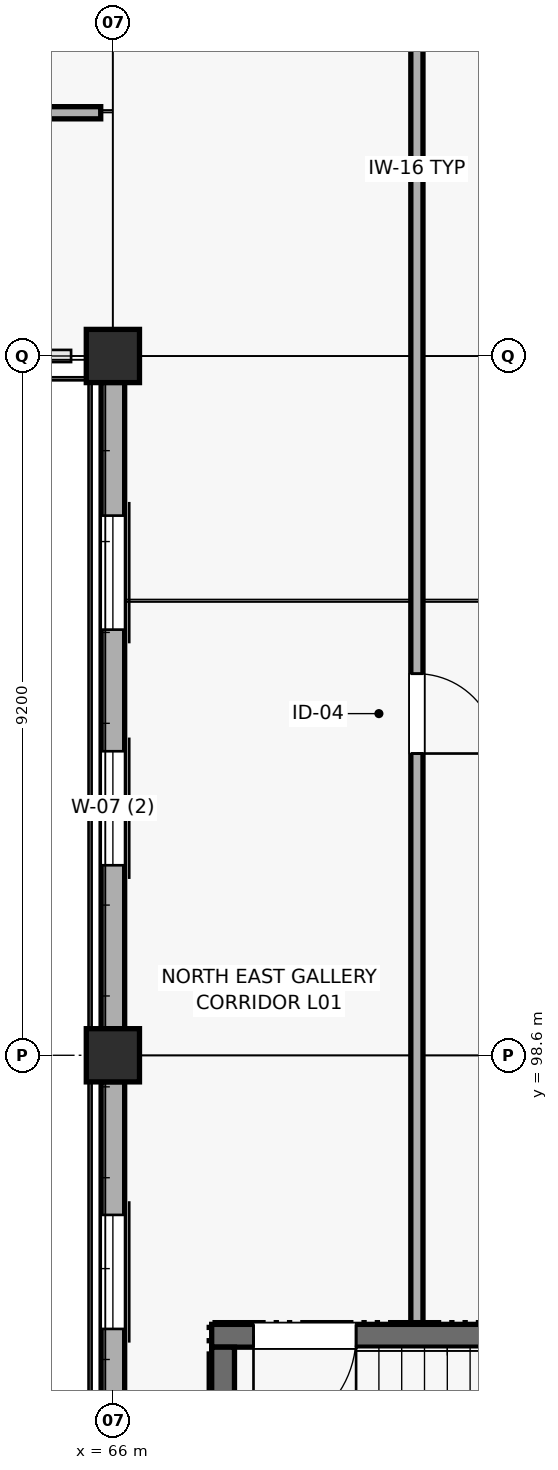
"""IFC4 building model, lengths in metres.
Left out: names, types, materials, properties, quantities, classifications, styles, units other than length and angle.
Written with IfcOpenShell. Run it as: python <this file> out.ifc"""

import sys

from ifc_helpers import new_model, si_unit, direction, frame, frame_2d, origin, origin_2d, place, context, subcontext, project, spatial, rectangle, extrude, element, fill, save


model = new_model("IFC4")
c1 = context("Model", 3, precision=1e-05, world=origin(), true_north=direction((0.0, 1.0)))
c2 = subcontext(c1, "Body", "Model", "MODEL_VIEW")
j1 = project(units=[si_unit("LENGTHUNIT", "METRE"), si_unit("PLANEANGLEUNIT", "RADIAN")], contexts=[c1])
p1 = place(None, origin())
s1 = spatial("IfcSite", under=j1, at=p1, CompositionType="ELEMENT")
p2 = place(p1, origin())
s2 = spatial("IfcBuilding", under=s1, at=p2, CompositionType="ELEMENT")
p3 = place(p2, frame((0.0, 0.0, 5.4)))
s3 = spatial("IfcBuildingStorey", under=s2, at=p3, CompositionType="ELEMENT", Elevation=5.4)
for number, where, z_axis, x_axis in (
    (1, (66.0, 98.6, 0.0), (0.0, 0.0, 1.0), (1.0, 0.0, 0.0)),
    (2, (66.0, 107.8, 0.0), (0.0, 0.0, 1.0), (1.0, 0.0, 0.0)),
):
    element("IfcColumn", number, at=place(p3, frame(where, z_axis=z_axis, x_axis=x_axis)), inside=s3, PredefinedType="COLUMN", context=c2, shape_type="SweptSolid", body=[
        extrude(rectangle(XDim=0.7, YDim=0.7, at=origin_2d()), origin(), (0.0, 0.0, 1.0), 4.5),
    ])
p4 = place(p3, frame((66.0, 89.748, 0.0), z_axis=(0.0, 0.0, 1.0), x_axis=(0.0, 1.0, 0.0)))
e3 = element("IfcWall", 3, at=p4, inside=s3, PredefinedType="SOLIDWALL", context=c2, shape_type="SweptSolid", body=[
    extrude(rectangle(XDim=8.504, YDim=0.31, at=frame_2d((4.252, 0.0))), origin(), (0.0, 0.0, 1.0), 3.725),
])
p5 = place(p4, frame((2.152, 0.0, 0.95)))
e4 = element("IfcOpeningElement", 4, at=p5, cuts=e3, PredefinedType="OPENING", context=c2, shape_type="SweptSolid", body=[
    extrude(rectangle(XDim=1.5, YDim=2.25, at=frame_2d((0.75, 1.125))), frame((0.0, 0.165, 0.0), z_axis=(0.0, -1.0, 0.0), x_axis=(1.0, 0.0, 0.0)), (0.0, 0.0, 1.0), 0.33),
])
p6 = place(p4, frame((5.252, 0.0, 0.95)))
e5 = element("IfcOpeningElement", 5, at=p6, cuts=e3, PredefinedType="OPENING", context=c2, shape_type="SweptSolid", body=[
    extrude(rectangle(XDim=1.5, YDim=2.25, at=frame_2d((0.75, 1.125))), frame((0.0, 0.165, 0.0), z_axis=(0.0, -1.0, 0.0), x_axis=(1.0, 0.0, 0.0)), (0.0, 0.0, 1.0), 0.33),
])
p7 = place(p3, frame((66.0, 98.948, 0.0), z_axis=(0.0, 0.0, 1.0), x_axis=(0.0, 1.0, 0.0)))
e6 = element("IfcWall", 6, at=p7, inside=s3, PredefinedType="SOLIDWALL", context=c2, shape_type="SweptSolid", body=[
    extrude(rectangle(XDim=8.504, YDim=0.31, at=frame_2d((4.252, 0.0))), origin(), (0.0, 0.0, 1.0), 3.725),
])
p8 = place(p7, frame((2.152, 0.0, 0.95)))
e7 = element("IfcOpeningElement", 7, at=p8, cuts=e6, PredefinedType="OPENING", context=c2, shape_type="SweptSolid", body=[
    extrude(rectangle(XDim=1.5, YDim=2.25, at=frame_2d((0.75, 1.125))), frame((0.0, 0.165, 0.0), z_axis=(0.0, -1.0, 0.0), x_axis=(1.0, 0.0, 0.0)), (0.0, 0.0, 1.0), 0.33),
])
p9 = place(p7, frame((5.252, 0.0, 0.95)))
e8 = element("IfcOpeningElement", 8, at=p9, cuts=e6, PredefinedType="OPENING", context=c2, shape_type="SweptSolid", body=[
    extrude(rectangle(XDim=1.5, YDim=2.25, at=frame_2d((0.75, 1.125))), frame((0.0, 0.165, 0.0), z_axis=(0.0, -1.0, 0.0), x_axis=(1.0, 0.0, 0.0)), (0.0, 0.0, 1.0), 0.33),
])
p10 = place(p3, frame((75.95, 94.91, 0.0), z_axis=(0.0, 0.0, 1.0), x_axis=(-1.0, 0.0, 0.0)))
e9 = element("IfcWall", 9, at=p10, inside=s3, PredefinedType="SHEAR", context=c2, shape_type="SweptSolid", body=[
    extrude(rectangle(XDim=8.65, YDim=0.3, at=frame_2d((4.325, 0.0))), origin(), (0.0, 0.0, 1.0), 4.28),
])
p11 = place(p10, frame((6.75, 0.0, 0.0)))
e10 = element("IfcOpeningElement", 10, at=p11, cuts=e9, PredefinedType="OPENING", context=c2, shape_type="SweptSolid", body=[
    extrude(rectangle(XDim=1.35, YDim=2.2, at=frame_2d((0.675, 1.1))), frame((0.0, 0.16, 0.0), z_axis=(0.0, -1.0, 0.0), x_axis=(1.0, 0.0, 0.0)), (0.0, 0.0, 1.0), 0.32),
])
p12 = place(p3, frame((67.45, 94.76, 0.0), z_axis=(0.0, 0.0, 1.0), x_axis=(0.0, -1.0, 0.0)))
e11 = element("IfcWall", 11, at=p12, inside=s3, PredefinedType="SHEAR", context=c2, shape_type="SweptSolid", body=[
    extrude(rectangle(XDim=3.36, YDim=0.3, at=frame_2d((1.68, 0.0))), origin(), (0.0, 0.0, 1.0), 4.28),
])
p13 = place(p3, frame((22.16, 111.0, 0.0), z_axis=(0.0, 0.0, 1.0), x_axis=(1.0, 0.0, 0.0)))
e12 = element("IfcWall", 12, at=p13, inside=s3, PredefinedType="PARTITIONING", context=c2, shape_type="SweptSolid", body=[
    extrude(rectangle(XDim=43.68, YDim=0.16, at=frame_2d((21.84, 0.0))), origin(), (0.0, 0.0, 1.0), 3.725),
])
p14 = place(p13, frame((12.0, 0.0, 0.0)))
e13 = element("IfcOpeningElement", 13, at=p14, cuts=e12, PredefinedType="OPENING", context=c2, shape_type="SweptSolid", body=[
    extrude(rectangle(XDim=1.7, YDim=2.35, at=frame_2d((0.85, 1.175))), frame((0.0, 0.09, 0.0), z_axis=(0.0, -1.0, 0.0), x_axis=(1.0, 0.0, 0.0)), (0.0, 0.0, 1.0), 0.18),
])
p15 = place(p13, frame((35.5, 0.0, 0.0)))
e14 = element("IfcOpeningElement", 14, at=p15, cuts=e12, PredefinedType="OPENING", context=c2, shape_type="SweptSolid", body=[
    extrude(rectangle(XDim=1.02, YDim=2.15, at=frame_2d((0.51, 1.075))), frame((0.0, 0.09, 0.0), z_axis=(0.0, -1.0, 0.0), x_axis=(1.0, 0.0, 0.0)), (0.0, 0.0, 1.0), 0.18),
])
p16 = place(p3, frame((70.0, 95.065, 0.0), z_axis=(0.0, 0.0, 1.0), x_axis=(0.0, 1.0, 0.0)))
e15 = element("IfcWall", 15, at=p16, inside=s3, PredefinedType="PARTITIONING", context=c2, shape_type="SweptSolid", body=[
    extrude(rectangle(XDim=21.76, YDim=0.16, at=frame_2d((10.88, 0.0))), origin(), (0.0, 0.0, 1.0), 3.625),
])
p17 = place(p16, frame((7.505, 0.0, 0.0)))
e16 = element("IfcOpeningElement", 16, at=p17, cuts=e15, PredefinedType="OPENING", context=c2, shape_type="SweptSolid", body=[
    extrude(rectangle(XDim=1.05, YDim=2.2, at=frame_2d((0.525, 1.1))), frame((0.0, 0.09, 0.0), z_axis=(0.0, -1.0, 0.0), x_axis=(1.0, 0.0, 0.0)), (0.0, 0.0, 1.0), 0.18),
])
p18 = place(p6, origin())
e17 = element("IfcWindow", 17, at=p18, inside=s3, PartitioningType="SINGLE_PANEL", PredefinedType="WINDOW", context=c2, shape_type="SweptSolid", body=[
    extrude(rectangle(XDim=1.5, YDim=2.25, at=frame_2d((0.75, 1.125))), frame((0.0, 0.03, 0.0), z_axis=(0.0, -1.0, 0.0), x_axis=(1.0, 0.0, 0.0)), (0.0, 0.0, 1.0), 0.06),
])
fill(e5, e17)
p19 = place(p8, origin())
e18 = element("IfcWindow", 18, at=p19, inside=s3, PartitioningType="SINGLE_PANEL", PredefinedType="WINDOW", context=c2, shape_type="SweptSolid", body=[
    extrude(rectangle(XDim=1.5, YDim=2.25, at=frame_2d((0.75, 1.125))), frame((0.0, 0.03, 0.0), z_axis=(0.0, -1.0, 0.0), x_axis=(1.0, 0.0, 0.0)), (0.0, 0.0, 1.0), 0.06),
])
fill(e7, e18)
p20 = place(p9, origin())
e19 = element("IfcWindow", 19, at=p20, inside=s3, PartitioningType="SINGLE_PANEL", PredefinedType="WINDOW", context=c2, shape_type="SweptSolid", body=[
    extrude(rectangle(XDim=1.5, YDim=2.25, at=frame_2d((0.75, 1.125))), frame((0.0, 0.03, 0.0), z_axis=(0.0, -1.0, 0.0), x_axis=(1.0, 0.0, 0.0)), (0.0, 0.0, 1.0), 0.06),
])
fill(e8, e19)
p21 = place(p11, origin())
e20 = element("IfcDoor", 20, at=p21, inside=s3, OperationType="SINGLE_SWING_RIGHT", PredefinedType="DOOR", context=c2, shape_type="SweptSolid", body=[
    extrude(rectangle(XDim=1.35, YDim=2.2, at=frame_2d((0.675, 1.1))), frame((0.0, 0.025, 0.0), z_axis=(0.0, -1.0, 0.0), x_axis=(1.0, 0.0, 0.0)), (0.0, 0.0, 1.0), 0.05),
])
fill(e10, e20)
p22 = place(p17, frame((1.05, 0.0, 0.0), z_axis=(0.0, 0.0, 1.0), x_axis=(-1.0, 0.0, 0.0)))
e21 = element("IfcDoor", 21, at=p22, inside=s3, OperationType="SINGLE_SWING_RIGHT", PredefinedType="DOOR", context=c2, shape_type="SweptSolid", body=[
    extrude(rectangle(XDim=1.05, YDim=2.2, at=frame_2d((0.525, 1.1))), frame((0.0, 0.025, 0.0), z_axis=(0.0, -1.0, 0.0), x_axis=(1.0, 0.0, 0.0)), (0.0, 0.0, 1.0), 0.05),
])
fill(e16, e21)
save(model, sys.argv[1])
